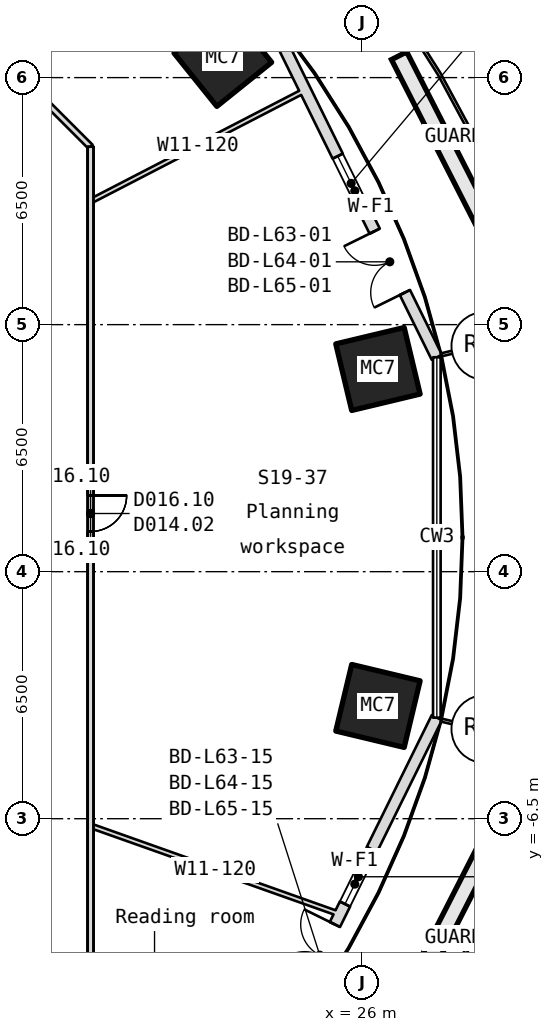
"""IFC4 building model, lengths in metres.
Left out: names, types, materials, properties, quantities, classifications, styles, units other than length and angle.
Written with IfcOpenShell. Run it as: python <this file> out.ifc"""

import sys

from ifc_helpers import new_model, si_unit, direction, frame, frame_2d, origin, origin_2d, place, context, subcontext, project, spatial, rectangle, hollow_rectangle, extrude, element, fill, save


model = new_model("IFC4")
c1 = context("Model", 3, precision=1e-05, world=origin(), true_north=direction((0.0, 1.0)))
c2 = subcontext(c1, "Body", "Model", "MODEL_VIEW")
j1 = project(units=[si_unit("LENGTHUNIT", "METRE"), si_unit("PLANEANGLEUNIT", "RADIAN")], contexts=[c1])
p1 = place(None, origin())
s1 = spatial("IfcSite", under=j1, at=p1, CompositionType="ELEMENT")
p2 = place(p1, origin())
s2 = spatial("IfcBuilding", under=s1, at=p2, CompositionType="ELEMENT")
p3 = place(p2, frame((0.0, 0.0, 284.5)))
s3 = spatial("IfcBuildingStorey", under=s2, at=p3, CompositionType="ELEMENT", Elevation=284.5)
for number, where, z_axis, x_axis in (
    (1, (26.413, 5.333, -0.18), (0.0, 0.0, 1.0), (0.233, -0.973, 0.0)),
    (2, (22.331, 13.524, -0.18), (0.0, 0.0, 1.0), (0.627, -0.779, 0.0)),
    (3, (26.413, -3.533, -0.18), (0.0, 0.0, 1.0), (-0.233, -0.973, 0.0)),
):
    element("IfcColumn", number, at=place(p3, frame(where, z_axis=z_axis, x_axis=x_axis)), inside=s3, PredefinedType="COLUMN", context=c2, shape_type="SweptSolid", body=[
        extrude(hollow_rectangle(XDim=1.8, YDim=1.85, WallThickness=0.06, at=origin_2d()), origin(), (0.0, 0.0, 1.0), 4.15),
    ])
p4 = place(p3, frame((27.962, 5.641, 0.0), z_axis=(0.0, 0.0, 1.0), x_axis=(-0.442107110685, 0.8969622638, 0.0)))
e4 = element("IfcWall", 4, at=p4, inside=s3, PredefinedType="SOLIDWALL", context=c2, shape_type="SweptSolid", body=[
    extrude(rectangle(XDim=9.767, YDim=0.3, at=frame_2d((4.884, 0.0))), origin(), (0.0, 0.0, 1.0), 3.97),
])
p5 = place(p4, frame((1.9, 0.0, 0.0)))
e5 = element("IfcOpeningElement", 5, at=p5, cuts=e4, PredefinedType="OPENING", context=c2, shape_type="SweptSolid", body=[
    extrude(rectangle(XDim=1.8, YDim=2.4, at=frame_2d((0.9, 1.2))), frame((0.0, 0.16, 0.0), z_axis=(0.0, -1.0, 0.0), x_axis=(1.0, 0.0, 0.0)), (0.0, 0.0, 1.0), 0.32),
])
p6 = place(p4, frame((4.3, 0.0, 0.9)))
e6 = element("IfcOpeningElement", 6, at=p6, cuts=e4, PredefinedType="OPENING", context=c2, shape_type="SweptSolid", body=[
    extrude(rectangle(XDim=1.6, YDim=1.5, at=frame_2d((0.8, 0.75))), frame((0.0, 0.16, 0.0), z_axis=(0.0, -1.0, 0.0), x_axis=(1.0, 0.0, 0.0)), (0.0, 0.0, 1.0), 0.32),
])
p7 = place(p3, frame((23.644, -12.602, 0.0), z_axis=(0.0, 0.0, 1.0), x_axis=(0.442107110685, 0.8969622638, 0.0)))
e7 = element("IfcWall", 7, at=p7, inside=s3, PredefinedType="SOLIDWALL", context=c2, shape_type="SweptSolid", body=[
    extrude(rectangle(XDim=9.767, YDim=0.3, at=frame_2d((4.884, 0.0))), origin(), (0.0, 0.0, 1.0), 3.97),
])
p8 = place(p7, frame((1.9, 0.0, 0.0)))
e8 = element("IfcOpeningElement", 8, at=p8, cuts=e7, PredefinedType="OPENING", context=c2, shape_type="SweptSolid", body=[
    extrude(rectangle(XDim=1.8, YDim=2.4, at=frame_2d((0.9, 1.2))), frame((0.0, 0.16, 0.0), z_axis=(0.0, -1.0, 0.0), x_axis=(1.0, 0.0, 0.0)), (0.0, 0.0, 1.0), 0.32),
])
p9 = place(p7, frame((4.3, 0.0, 0.9)))
e9 = element("IfcOpeningElement", 9, at=p9, cuts=e7, PredefinedType="OPENING", context=c2, shape_type="SweptSolid", body=[
    extrude(rectangle(XDim=1.6, YDim=1.5, at=frame_2d((0.8, 0.75))), frame((0.0, 0.16, 0.0), z_axis=(0.0, -1.0, 0.0), x_axis=(1.0, 0.0, 0.0)), (0.0, 0.0, 1.0), 0.32),
])
p10 = place(p3, frame((14.18, 15.85, 0.0), z_axis=(0.0, 0.0, 1.0), x_axis=(0.707106781187, -0.707106781187, 0.0)))
e10 = element("IfcWall", 10, at=p10, inside=s3, PredefinedType="PARTITIONING", context=c2, shape_type="SweptSolid", body=[
    extrude(rectangle(XDim=6.604, YDim=0.15, at=frame_2d((3.302, 0.0))), origin(), (0.0, 0.0, 1.0), 3.97),
])
p11 = place(p3, frame((18.85, -6.686, 0.0), z_axis=(0.0, 0.0, 1.0), x_axis=(0.942465522023, -0.334303364923, 0.0)))
e11 = element("IfcWall", 11, at=p11, inside=s3, PredefinedType="PARTITIONING", context=c2, shape_type="SweptSolid", body=[
    extrude(rectangle(XDim=6.963, YDim=0.12, at=frame_2d((3.482, 0.0))), origin(), (0.0, 0.0, 1.0), 3.97),
])
p12 = place(p3, frame((18.85, 9.747, 0.0), z_axis=(0.0, 0.0, 1.0), x_axis=(0.888271654615, 0.459318481675, 0.0)))
e12 = element("IfcWall", 12, at=p12, inside=s3, PredefinedType="PARTITIONING", context=c2, shape_type="SweptSolid", body=[
    extrude(rectangle(XDim=6.36, YDim=0.12, at=frame_2d((3.18, 0.0))), origin(), (0.0, 0.0, 1.0), 3.97),
])
p13 = place(p3, frame((18.85, 11.18, 0.0), z_axis=(0.0, 0.0, 1.0), x_axis=(0.0, -1.0, 0.0)))
e13 = element("IfcWall", 13, at=p13, inside=s3, PredefinedType="PARTITIONING", context=c2, shape_type="SweptSolid", body=[
    extrude(rectangle(XDim=22.361, YDim=0.15, at=frame_2d((11.18, 0.0))), origin(), (0.0, 0.0, 1.0), 3.97),
])
p14 = place(p13, frame((9.175, 0.0, 0.0)))
e14 = element("IfcOpeningElement", 14, at=p14, cuts=e13, PredefinedType="OPENING", context=c2, shape_type="SweptSolid", body=[
    extrude(rectangle(XDim=0.95, YDim=2.1, at=frame_2d((0.475, 1.05))), frame((0.0, 0.085, 0.0), z_axis=(0.0, -1.0, 0.0), x_axis=(1.0, 0.0, 0.0)), (0.0, 0.0, 1.0), 0.17),
])
p15 = place(p5, origin())
e15 = element("IfcDoor", 15, at=p15, inside=s3, OperationType="SINGLE_SWING_LEFT", PredefinedType="DOOR", context=c2, shape_type="SweptSolid", body=[
    extrude(rectangle(XDim=1.8, YDim=2.4, at=frame_2d((0.9, 1.2))), frame((0.0, 0.025, 0.0), z_axis=(0.0, -1.0, 0.0), x_axis=(1.0, 0.0, 0.0)), (0.0, 0.0, 1.0), 0.05),
])
fill(e5, e15)
p16 = place(p6, origin())
e16 = element("IfcWindow", 16, at=p16, inside=s3, PartitioningType="SINGLE_PANEL", PredefinedType="WINDOW", context=c2, shape_type="SweptSolid", body=[
    extrude(rectangle(XDim=1.6, YDim=1.5, at=frame_2d((0.8, 0.75))), frame((0.0, 0.03, 0.0), z_axis=(0.0, -1.0, 0.0), x_axis=(1.0, 0.0, 0.0)), (0.0, 0.0, 1.0), 0.06),
])
fill(e6, e16)
p17 = place(p8, origin())
e17 = element("IfcDoor", 17, at=p17, inside=s3, OperationType="SINGLE_SWING_LEFT", PredefinedType="DOOR", context=c2, shape_type="SweptSolid", body=[
    extrude(rectangle(XDim=1.8, YDim=2.4, at=frame_2d((0.9, 1.2))), frame((0.0, 0.025, 0.0), z_axis=(0.0, -1.0, 0.0), x_axis=(1.0, 0.0, 0.0)), (0.0, 0.0, 1.0), 0.05),
])
fill(e8, e17)
p18 = place(p9, origin())
e18 = element("IfcWindow", 18, at=p18, inside=s3, PartitioningType="SINGLE_PANEL", PredefinedType="WINDOW", context=c2, shape_type="SweptSolid", body=[
    extrude(rectangle(XDim=1.6, YDim=1.5, at=frame_2d((0.8, 0.75))), frame((0.0, 0.03, 0.0), z_axis=(0.0, -1.0, 0.0), x_axis=(1.0, 0.0, 0.0)), (0.0, 0.0, 1.0), 0.06),
])
fill(e9, e18)
p19 = place(p14, origin())
e19 = element("IfcDoor", 19, at=p19, inside=s3, OperationType="SINGLE_SWING_RIGHT", PredefinedType="DOOR", context=c2, shape_type="SweptSolid", body=[
    extrude(rectangle(XDim=0.95, YDim=2.1, at=frame_2d((0.475, 1.05))), frame((0.0, 0.025, 0.0), z_axis=(0.0, -1.0, 0.0), x_axis=(1.0, 0.0, 0.0)), (0.0, 0.0, 1.0), 0.05),
])
fill(e14, e19)
save(model, sys.argv[1])
